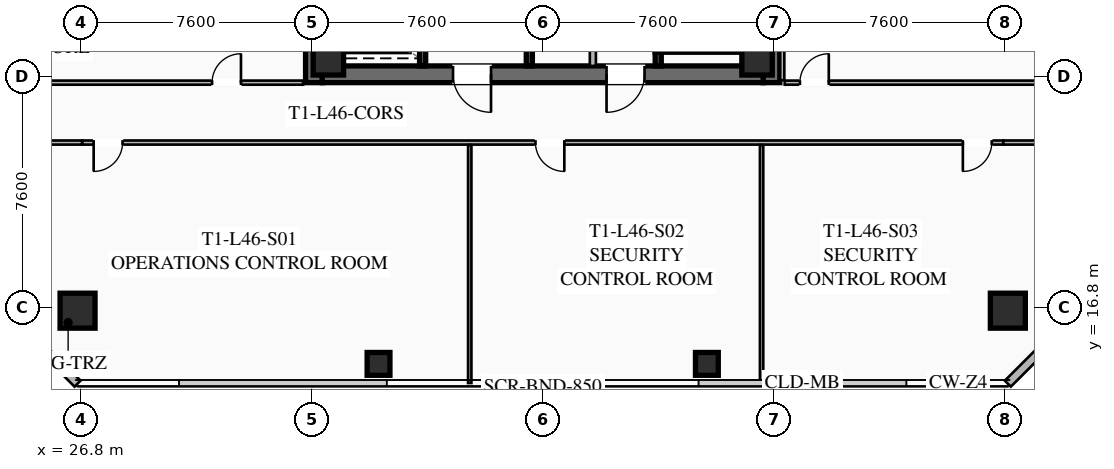
"""IFC4 building model, lengths in metres.
Left out: names, types, materials, properties, quantities, classifications, styles, units other than length and angle.
Written with IfcOpenShell. Run it as: python <this file> out.ifc"""

import sys

from ifc_helpers import new_model, si_unit, direction, frame, frame_2d, origin, origin_2d, place, context, subcontext, project, spatial, rectangle, hollow_rectangle, extrude, element, fill, save


model = new_model("IFC4")
c1 = context("Model", 3, precision=1e-05, world=origin(), true_north=direction((0.0, 1.0)))
c2 = subcontext(c1, "Body", "Model", "MODEL_VIEW")
j1 = project(units=[si_unit("LENGTHUNIT", "METRE"), si_unit("PLANEANGLEUNIT", "RADIAN")], contexts=[c1])
p1 = place(None, origin())
s1 = spatial("IfcSite", under=j1, at=p1, CompositionType="ELEMENT")
p2 = place(p1, origin())
s2 = spatial("IfcBuilding", under=s1, at=p2, CompositionType="ELEMENT")
p3 = place(p2, frame((0.0, 0.0, 171.2)))
s3 = spatial("IfcBuildingStorey", under=s2, at=p3, CompositionType="ELEMENT", Elevation=171.2)
for number, where, z_axis, x_axis in (
    (1, (34.475, 24.2, 0.0), (0.0, 0.0, 1.0), (0.0, 1.0, 0.0)),
    (2, (49.525, 39.8, 0.0), (0.0, 0.0, 1.0), (0.0, -1.0, 0.0)),
):
    element("IfcWall", number, at=place(p3, frame(where, z_axis=z_axis, x_axis=x_axis)), inside=s3, PredefinedType="SHEAR", context=c2, shape_type="SweptSolid", body=[
        extrude(rectangle(XDim=15.6, YDim=0.55, at=frame_2d((7.8, 0.0))), origin(), (0.0, 0.0, 1.0), 3.55),
    ])
p4 = place(p3, frame((49.25, 24.475, 0.0), z_axis=(0.0, 0.0, 1.0), x_axis=(-1.0, 0.0, 0.0)))
e3 = element("IfcWall", 3, at=p4, inside=s3, PredefinedType="SHEAR", context=c2, shape_type="SweptSolid", body=[
    extrude(rectangle(XDim=14.5, YDim=0.55, at=frame_2d((7.25, 0.0))), origin(), (0.0, 0.0, 1.0), 3.55),
])
p5 = place(p4, frame((8.95, 0.0, 0.0)))
e4 = element("IfcOpeningElement", 4, at=p5, cuts=e3, PredefinedType="OPENING", context=c2, shape_type="SweptSolid", body=[
    extrude(rectangle(XDim=1.25, YDim=2.25, at=frame_2d((0.625, 1.125))), frame((0.0, 0.285, 0.0), z_axis=(0.0, -1.0, 0.0), x_axis=(1.0, 0.0, 0.0)), (0.0, 0.0, 1.0), 0.57),
])
p6 = place(p4, frame((3.9, 0.0, 0.0)))
e5 = element("IfcOpeningElement", 5, at=p6, cuts=e3, PredefinedType="OPENING", context=c2, shape_type="SweptSolid", body=[
    extrude(rectangle(XDim=1.25, YDim=2.25, at=frame_2d((0.625, 1.125))), frame((0.0, 0.285, 0.0), z_axis=(0.0, -1.0, 0.0), x_axis=(1.0, 0.0, 0.0)), (0.0, 0.0, 1.0), 0.57),
])
for number, where, z_axis, x_axis in (
    (6, (34.95, 24.95, 0.0), (0.0, 0.0, 1.0), (1.0, 0.0, 0.0)),
    (7, (49.05, 24.95, 0.0), (0.0, 0.0, 1.0), (1.0, 0.0, 0.0)),
):
    element("IfcColumn", number, at=place(p3, frame(where, z_axis=z_axis, x_axis=x_axis)), inside=s3, PredefinedType="COLUMN", context=c2, shape_type="SweptSolid", body=[
        extrude(hollow_rectangle(XDim=1.0, YDim=1.0, WallThickness=0.04, at=origin_2d()), origin(), (0.0, 0.0, 1.0), 3.37),
    ])
for number, where, z_axis, x_axis in (
    (8, (26.7, 16.7, 0.0), (0.0, 0.0, 1.0), (1.0, 0.0, 0.0)),
    (9, (57.3, 16.7, 0.0), (0.0, 0.0, 1.0), (1.0, 0.0, 0.0)),
):
    element("IfcColumn", number, at=place(p3, frame(where, z_axis=z_axis, x_axis=x_axis)), inside=s3, PredefinedType="COLUMN", context=c2, shape_type="SweptSolid", body=[
        extrude(hollow_rectangle(XDim=1.15, YDim=1.15, WallThickness=0.045, at=origin_2d()), origin(), (0.0, 0.0, 1.0), 3.37),
    ])
for number, where, z_axis, x_axis in (
    (10, (36.6, 14.95, 0.0), (0.0, 0.0, 1.0), (1.0, 0.0, 0.0)),
    (11, (47.4, 14.95, 0.0), (0.0, 0.0, 1.0), (1.0, 0.0, 0.0)),
):
    element("IfcColumn", number, at=place(p3, frame(where, z_axis=z_axis, x_axis=x_axis)), inside=s3, PredefinedType="COLUMN", context=c2, shape_type="SweptSolid", body=[
        extrude(hollow_rectangle(XDim=0.75, YDim=0.75, WallThickness=0.032, at=origin_2d()), origin(), (0.0, 0.0, 1.0), 3.37),
    ])
for number, where, z_axis, x_axis in (
    (12, (26.7, 14.3, 0.0), (0.0, 0.0, 1.0), (-0.707, 0.707, 0.0)),
    (13, (59.7, 16.7, 0.0), (0.0, 0.0, 1.0), (-0.707, -0.707, 0.0)),
):
    element("IfcWall", number, at=place(p3, frame(where, z_axis=z_axis, x_axis=x_axis)), inside=s3, PredefinedType="SOLIDWALL", context=c2, shape_type="SweptSolid", body=[
        extrude(rectangle(XDim=3.394, YDim=0.28, at=frame_2d((1.697, 0.0))), origin(), (0.0, 0.0, 1.0), 3.37),
    ])
p7 = place(p3, frame((45.8, 32.8, 0.0), z_axis=(0.0, 0.0, 1.0), x_axis=(0.0, -1.0, 0.0)))
e14 = element("IfcWall", 14, at=p7, inside=s3, PredefinedType="SHEAR", context=c2, shape_type="SweptSolid", body=[
    extrude(rectangle(XDim=8.05, YDim=0.2, at=frame_2d((4.025, 0.0))), origin(), (0.0, 0.0, 1.0), 3.37),
])
p8 = place(p7, frame((0.45, 0.0, 0.0)))
e15 = element("IfcOpeningElement", 15, at=p8, cuts=e14, PredefinedType="OPENING", context=c2, shape_type="SweptSolid", body=[
    extrude(rectangle(XDim=1.15, YDim=2.2, at=frame_2d((0.575, 1.1))), frame((0.0, 0.11, 0.0), z_axis=(0.0, -1.0, 0.0), x_axis=(1.0, 0.0, 0.0)), (0.0, 0.0, 1.0), 0.22),
])
p9 = place(p3, frame((41.56, 24.75, 0.0), z_axis=(0.0, 0.0, 1.0), x_axis=(0.0, 1.0, 0.0)))
e16 = element("IfcWall", 16, at=p9, inside=s3, PredefinedType="SHEAR", context=c2, shape_type="SweptSolid", body=[
    extrude(rectangle(XDim=14.5, YDim=0.2, at=frame_2d((7.25, 0.0))), origin(), (0.0, 0.0, 1.0), 3.37),
])
p10 = place(p3, frame((38.05, 24.75, 0.0), z_axis=(0.0, 0.0, 1.0), x_axis=(0.0, 1.0, 0.0)))
e17 = element("IfcWall", 17, at=p10, inside=s3, PredefinedType="SHEAR", context=c2, shape_type="SweptSolid", body=[
    extrude(rectangle(XDim=6.45, YDim=0.2, at=frame_2d((3.225, 0.0))), origin(), (0.0, 0.0, 1.0), 3.37),
])
p11 = place(p10, frame((4.875, 0.0, 0.0)))
e18 = element("IfcOpeningElement", 18, at=p11, cuts=e17, PredefinedType="OPENING", context=c2, shape_type="SweptSolid", body=[
    extrude(rectangle(XDim=1.3, YDim=2.25, at=frame_2d((0.65, 1.125))), frame((0.0, 0.11, 0.0), z_axis=(0.0, -1.0, 0.0), x_axis=(1.0, 0.0, 0.0)), (0.0, 0.0, 1.0), 0.22),
])
p12 = place(p10, frame((2.875, 0.0, 0.0)))
e19 = element("IfcOpeningElement", 19, at=p12, cuts=e17, PredefinedType="OPENING", context=c2, shape_type="SweptSolid", body=[
    extrude(rectangle(XDim=1.3, YDim=2.25, at=frame_2d((0.65, 1.125))), frame((0.0, 0.11, 0.0), z_axis=(0.0, -1.0, 0.0), x_axis=(1.0, 0.0, 0.0)), (0.0, 0.0, 1.0), 0.22),
])
p13 = place(p10, frame((0.675, 0.0, 0.0)))
e20 = element("IfcOpeningElement", 20, at=p13, cuts=e17, PredefinedType="OPENING", context=c2, shape_type="SweptSolid", body=[
    extrude(rectangle(XDim=1.3, YDim=2.25, at=frame_2d((0.65, 1.125))), frame((0.0, 0.11, 0.0), z_axis=(0.0, -1.0, 0.0), x_axis=(1.0, 0.0, 0.0)), (0.0, 0.0, 1.0), 0.22),
])
p14 = place(p3, frame((43.65, 24.75, 0.0), z_axis=(0.0, 0.0, 1.0), x_axis=(0.0, 1.0, 0.0)))
e21 = element("IfcWall", 21, at=p14, inside=s3, PredefinedType="SOLIDWALL", context=c2, shape_type="SweptSolid", body=[
    extrude(rectangle(XDim=6.9, YDim=0.2, at=frame_2d((3.45, 0.0))), origin(), (0.0, 0.0, 1.0), 2.723),
])
p15 = place(p14, frame((0.85, 0.0, 0.0)))
e22 = element("IfcOpeningElement", 22, at=p15, cuts=e21, PredefinedType="OPENING", context=c2, shape_type="SweptSolid", body=[
    extrude(rectangle(XDim=0.95, YDim=2.05, at=frame_2d((0.475, 1.025))), frame((0.0, 0.11, 0.0), z_axis=(0.0, -1.0, 0.0), x_axis=(1.0, 0.0, 0.0)), (0.0, 0.0, 1.0), 0.22),
])
p16 = place(p14, frame((4.8, 0.0, 0.0)))
e23 = element("IfcOpeningElement", 23, at=p16, cuts=e21, PredefinedType="OPENING", context=c2, shape_type="SweptSolid", body=[
    extrude(rectangle(XDim=1.05, YDim=2.2, at=frame_2d((0.525, 1.1))), frame((0.0, 0.11, 0.0), z_axis=(0.0, -1.0, 0.0), x_axis=(1.0, 0.0, 0.0)), (0.0, 0.0, 1.0), 0.22),
])
p17 = place(p3, frame((57.15, 22.23, 0.0), z_axis=(0.0, 0.0, 1.0), x_axis=(-1.0, 0.0, 0.0)))
e24 = element("IfcWall", 24, at=p17, inside=s3, PredefinedType="PARTITIONING", context=c2, shape_type="SweptSolid", body=[
    extrude(rectangle(XDim=30.3, YDim=0.135, at=frame_2d((15.15, 0.0))), origin(), (0.0, 0.0, 1.0), 2.723),
])
p18 = place(p17, frame((28.97, 0.0, 0.0)))
e25 = element("IfcOpeningElement", 25, at=p18, cuts=e24, PredefinedType="OPENING", context=c2, shape_type="SweptSolid", body=[
    extrude(rectangle(XDim=0.95, YDim=2.05, at=frame_2d((0.475, 1.025))), frame((0.0, 0.077, 0.0), z_axis=(0.0, -1.0, 0.0), x_axis=(1.0, 0.0, 0.0)), (0.0, 0.0, 1.0), 0.155),
])
p19 = place(p17, frame((14.438, 0.0, 0.0)))
e26 = element("IfcOpeningElement", 26, at=p19, cuts=e24, PredefinedType="OPENING", context=c2, shape_type="SweptSolid", body=[
    extrude(rectangle(XDim=0.95, YDim=2.05, at=frame_2d((0.475, 1.025))), frame((0.0, 0.077, 0.0), z_axis=(0.0, -1.0, 0.0), x_axis=(1.0, 0.0, 0.0)), (0.0, 0.0, 1.0), 0.155),
])
p20 = place(p17, frame((0.38, 0.0, 0.0)))
e27 = element("IfcOpeningElement", 27, at=p20, cuts=e24, PredefinedType="OPENING", context=c2, shape_type="SweptSolid", body=[
    extrude(rectangle(XDim=0.95, YDim=2.05, at=frame_2d((0.475, 1.025))), frame((0.0, 0.077, 0.0), z_axis=(0.0, -1.0, 0.0), x_axis=(1.0, 0.0, 0.0)), (0.0, 0.0, 1.0), 0.155),
])
for number, where, z_axis, x_axis in (
    (28, (24.32, 22.23, 0.0), (0.0, 0.0, 1.0), (1.0, 0.0, 0.0)),
    (29, (57.15, 22.23, 0.0), (0.0, 0.0, 1.0), (1.0, 0.0, 0.0)),
):
    element("IfcWall", number, at=place(p3, frame(where, z_axis=z_axis, x_axis=x_axis)), inside=s3, PredefinedType="PARTITIONING", context=c2, shape_type="SweptSolid", body=[
        extrude(rectangle(XDim=2.53, YDim=0.135, at=frame_2d((1.265, 0.0))), origin(), (0.0, 0.0, 1.0), 2.723),
    ])
for number, where, z_axis, x_axis in (
    (30, (39.6, 14.32, 0.0), (0.0, 0.0, 1.0), (0.0, 1.0, 0.0)),
    (31, (49.2, 14.32, 0.0), (0.0, 0.0, 1.0), (0.0, 1.0, 0.0)),
):
    element("IfcWall", number, at=place(p3, frame(where, z_axis=z_axis, x_axis=x_axis)), inside=s3, PredefinedType="PARTITIONING", context=c2, shape_type="SweptSolid", body=[
        extrude(rectangle(XDim=7.83, YDim=0.11, at=frame_2d((3.915, 0.0))), origin(), (0.0, 0.0, 1.0), 2.723),
    ])
p21 = place(p3, frame((49.88, 39.72, 0.0), z_axis=(0.0, 0.0, 1.0), x_axis=(0.0, -1.0, 0.0)))
e32 = element("IfcWall", 32, at=p21, inside=s3, PredefinedType="PARTITIONING", context=c2, shape_type="SweptSolid", body=[
    extrude(rectangle(XDim=15.44, YDim=0.135, at=frame_2d((7.72, 0.0))), origin(), (0.0, 0.0, 1.0), 2.723),
])
p22 = place(p3, frame((49.96, 24.2, 0.0), z_axis=(0.0, 0.0, 1.0), x_axis=(1.0, 0.0, 0.0)))
e33 = element("IfcWall", 33, at=p22, inside=s3, PredefinedType="PARTITIONING", context=c2, shape_type="SweptSolid", body=[
    extrude(rectangle(XDim=9.57, YDim=0.135, at=frame_2d((4.785, 0.0))), origin(), (0.0, 0.0, 1.0), 2.723),
])
p23 = place(p22, frame((0.5, 0.0, 0.0)))
e34 = element("IfcOpeningElement", 34, at=p23, cuts=e33, PredefinedType="OPENING", context=c2, shape_type="SweptSolid", body=[
    extrude(rectangle(XDim=0.95, YDim=2.05, at=frame_2d((0.475, 1.025))), frame((0.0, 0.077, 0.0), z_axis=(0.0, -1.0, 0.0), x_axis=(1.0, 0.0, 0.0)), (0.0, 0.0, 1.0), 0.155),
])
p24 = place(p3, frame((24.32, 24.2, 0.0), z_axis=(0.0, 0.0, 1.0), x_axis=(1.0, 0.0, 0.0)))
e35 = element("IfcWall", 35, at=p24, inside=s3, PredefinedType="PARTITIONING", context=c2, shape_type="SweptSolid", body=[
    extrude(rectangle(XDim=9.8, YDim=0.135, at=frame_2d((4.9, 0.0))), origin(), (0.0, 0.0, 1.0), 2.723),
])
p25 = place(p24, frame((6.805, 0.0, 0.0)))
e36 = element("IfcOpeningElement", 36, at=p25, cuts=e35, PredefinedType="OPENING", context=c2, shape_type="SweptSolid", body=[
    extrude(rectangle(XDim=0.95, YDim=2.05, at=frame_2d((0.475, 1.025))), frame((0.0, 0.077, 0.0), z_axis=(0.0, -1.0, 0.0), x_axis=(1.0, 0.0, 0.0)), (0.0, 0.0, 1.0), 0.155),
])
p26 = place(p5, origin())
e37 = element("IfcDoor", 37, at=p26, inside=s3, OperationType="SINGLE_SWING_LEFT", PredefinedType="DOOR", context=c2, shape_type="SweptSolid", body=[
    extrude(rectangle(XDim=1.25, YDim=2.25, at=frame_2d((0.625, 1.125))), frame((0.0, 0.025, 0.0), z_axis=(0.0, -1.0, 0.0), x_axis=(1.0, 0.0, 0.0)), (0.0, 0.0, 1.0), 0.05),
])
fill(e4, e37)
p27 = place(p6, origin())
e38 = element("IfcDoor", 38, at=p27, inside=s3, OperationType="SINGLE_SWING_RIGHT", PredefinedType="DOOR", context=c2, shape_type="SweptSolid", body=[
    extrude(rectangle(XDim=1.25, YDim=2.25, at=frame_2d((0.625, 1.125))), frame((0.0, 0.025, 0.0), z_axis=(0.0, -1.0, 0.0), x_axis=(1.0, 0.0, 0.0)), (0.0, 0.0, 1.0), 0.05),
])
fill(e5, e38)
p28 = place(p18, origin())
e39 = element("IfcDoor", 39, at=p28, inside=s3, OperationType="SINGLE_SWING_RIGHT", PredefinedType="DOOR", context=c2, shape_type="SweptSolid", body=[
    extrude(rectangle(XDim=0.95, YDim=2.05, at=frame_2d((0.475, 1.025))), frame((0.0, 0.025, 0.0), z_axis=(0.0, -1.0, 0.0), x_axis=(1.0, 0.0, 0.0)), (0.0, 0.0, 1.0), 0.05),
])
fill(e25, e39)
p29 = place(p19, origin())
e40 = element("IfcDoor", 40, at=p29, inside=s3, OperationType="SINGLE_SWING_LEFT", PredefinedType="DOOR", context=c2, shape_type="SweptSolid", body=[
    extrude(rectangle(XDim=0.95, YDim=2.05, at=frame_2d((0.475, 1.025))), frame((0.0, 0.025, 0.0), z_axis=(0.0, -1.0, 0.0), x_axis=(1.0, 0.0, 0.0)), (0.0, 0.0, 1.0), 0.05),
])
fill(e26, e40)
p30 = place(p20, origin())
e41 = element("IfcDoor", 41, at=p30, inside=s3, OperationType="SINGLE_SWING_RIGHT", PredefinedType="DOOR", context=c2, shape_type="SweptSolid", body=[
    extrude(rectangle(XDim=0.95, YDim=2.05, at=frame_2d((0.475, 1.025))), frame((0.0, 0.025, 0.0), z_axis=(0.0, -1.0, 0.0), x_axis=(1.0, 0.0, 0.0)), (0.0, 0.0, 1.0), 0.05),
])
fill(e27, e41)
p31 = place(p23, origin())
e42 = element("IfcDoor", 42, at=p31, inside=s3, OperationType="SINGLE_SWING_RIGHT", PredefinedType="DOOR", context=c2, shape_type="SweptSolid", body=[
    extrude(rectangle(XDim=0.95, YDim=2.05, at=frame_2d((0.475, 1.025))), frame((0.0, 0.025, 0.0), z_axis=(0.0, -1.0, 0.0), x_axis=(1.0, 0.0, 0.0)), (0.0, 0.0, 1.0), 0.05),
])
fill(e34, e42)
p32 = place(p25, origin())
e43 = element("IfcDoor", 43, at=p32, inside=s3, OperationType="SINGLE_SWING_RIGHT", PredefinedType="DOOR", context=c2, shape_type="SweptSolid", body=[
    extrude(rectangle(XDim=0.95, YDim=2.05, at=frame_2d((0.475, 1.025))), frame((0.0, 0.025, 0.0), z_axis=(0.0, -1.0, 0.0), x_axis=(1.0, 0.0, 0.0)), (0.0, 0.0, 1.0), 0.05),
])
fill(e36, e43)
save(model, sys.argv[1])
